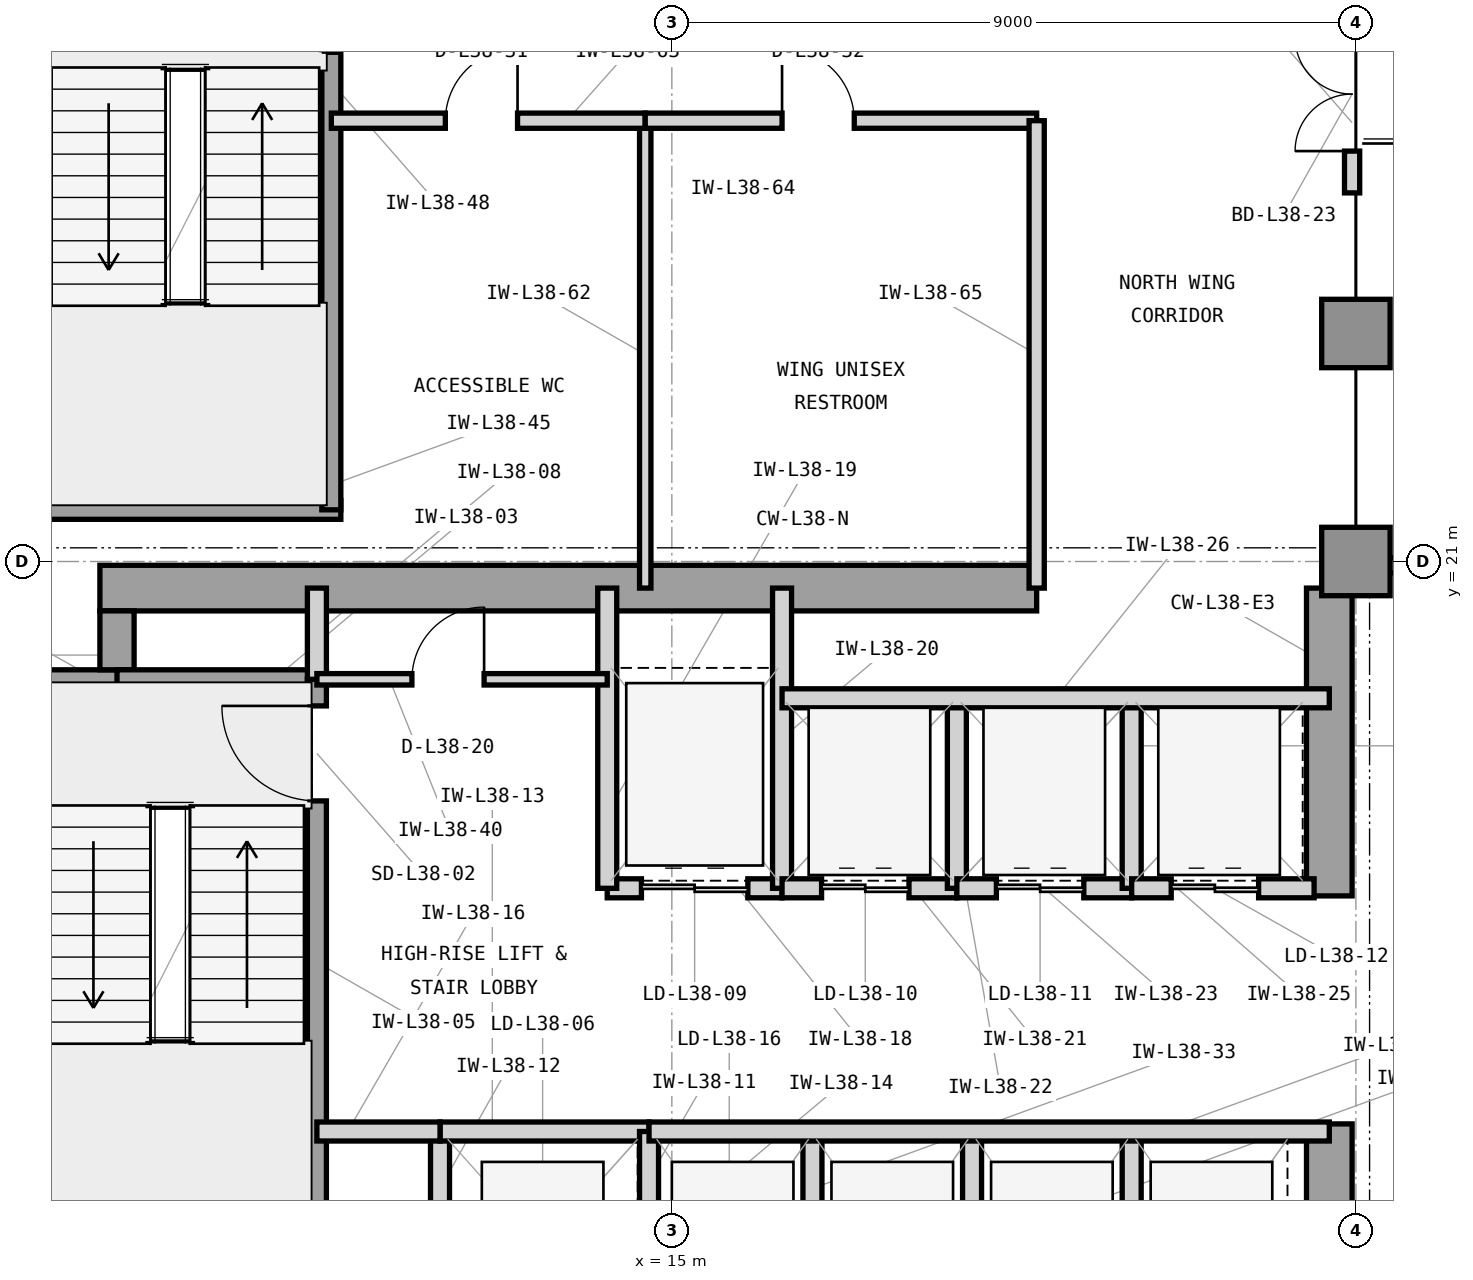
"""IFC4 building model, lengths in metres.
Left out: names, types, materials, properties, quantities, classifications, styles, units other than length and angle.
Written with IfcOpenShell. Run it as: python <this file> out.ifc"""

import sys

from ifc_helpers import new_model, si_unit, direction, frame, frame_2d, origin, origin_2d, place, context, subcontext, project, spatial, rectangle, extrude, element, fill, save


model = new_model("IFC4")
c1 = context("Model", 3, precision=1e-05, world=origin(), true_north=direction((0.0, 1.0)))
c2 = subcontext(c1, "Body", "Model", "MODEL_VIEW")
j1 = project(units=[si_unit("LENGTHUNIT", "METRE"), si_unit("PLANEANGLEUNIT", "RADIAN")], contexts=[c1])
p1 = place(None, origin())
s1 = spatial("IfcSite", under=j1, at=p1, CompositionType="ELEMENT")
p2 = place(p1, origin())
s2 = spatial("IfcBuilding", under=s1, at=p2, CompositionType="ELEMENT")
p3 = place(p2, frame((0.0, 0.0, 160.2)))
s3 = spatial("IfcBuildingStorey", under=s2, at=p3, CompositionType="ELEMENT", Elevation=160.2)
p4 = place(p3, frame((7.475, 20.65, 0.0), z_axis=(0.0, 0.0, 1.0), x_axis=(1.0, 0.0, 0.0)))
e1 = element("IfcWall", 1, at=p4, inside=s3, PredefinedType="SHEAR", context=c2, shape_type="SweptSolid", body=[
    extrude(rectangle(XDim=12.325, YDim=0.6, at=frame_2d((6.163, 0.0))), origin(), (0.0, 0.0, 1.0), 4.2),
])
p5 = place(p3, frame((23.65, 10.4, 0.0), z_axis=(0.0, 0.0, 1.0), x_axis=(0.0, 1.0, 0.0)))
e2 = element("IfcWall", 2, at=p5, inside=s3, PredefinedType="SHEAR", context=c2, shape_type="SweptSolid", body=[
    extrude(rectangle(XDim=3.2, YDim=0.6, at=frame_2d((1.6, 0.0))), origin(), (0.0, 0.0, 1.0), 4.2),
])
p6 = place(p3, frame((23.65, 16.6, 0.0), z_axis=(0.0, 0.0, 1.0), x_axis=(0.0, 1.0, 0.0)))
e3 = element("IfcWall", 3, at=p6, inside=s3, PredefinedType="SHEAR", context=c2, shape_type="SweptSolid", body=[
    extrude(rectangle(XDim=4.05, YDim=0.6, at=frame_2d((2.025, 0.0))), origin(), (0.0, 0.0, 1.0), 4.2),
])
p7 = place(p3, frame((6.65, 19.35, 0.0), z_axis=(0.0, 0.0, 1.0), x_axis=(1.0, 0.0, 0.0)))
e4 = element("IfcWall", 4, at=p7, inside=s3, PredefinedType="SHEAR", context=c2, shape_type="SweptSolid", body=[
    extrude(rectangle(XDim=1.275, YDim=0.45, at=frame_2d((0.638, 0.0))), origin(), (0.0, 0.0, 1.0), 4.2),
])
p8 = place(p3, frame((7.7, 19.575, 0.0), z_axis=(0.0, 0.0, 1.0), x_axis=(0.0, 1.0, 0.0)))
e5 = element("IfcWall", 5, at=p8, inside=s3, PredefinedType="SHEAR", context=c2, shape_type="SweptSolid", body=[
    extrude(rectangle(XDim=0.775, YDim=0.45, at=frame_2d((0.388, 0.0))), origin(), (0.0, 0.0, 1.0), 4.2),
])
for number, where, z_axis, x_axis in (
    (6, (24.0, 21.0, 0.0), (0.0, 0.0, 1.0), (1.0, 0.0, 0.0)),
    (7, (24.0, 24.0, 0.0), (0.0, 0.0, 1.0), (1.0, 0.0, 0.0)),
):
    element("IfcColumn", number, at=place(p3, frame(where, z_axis=z_axis, x_axis=x_axis)), inside=s3, PredefinedType="COLUMN", context=c2, shape_type="SweptSolid", body=[
        extrude(rectangle(XDim=0.9, YDim=0.9, at=origin_2d()), origin(), (0.0, 0.0, 1.0), 4.2),
    ])
p9 = place(p3, frame((7.7, 19.45, 0.0), z_axis=(0.0, 0.0, 1.0), x_axis=(1.0, 0.0, 0.0)))
e8 = element("IfcWall", 8, at=p9, inside=s3, PredefinedType="SHEAR", context=c2, shape_type="SweptSolid", body=[
    extrude(rectangle(XDim=2.755, YDim=0.25, at=frame_2d((1.377, 0.0))), origin(), (0.0, 0.0, 1.0), 4.2),
])
p10 = place(p3, frame((10.33, 12.0, 0.0), z_axis=(0.0, 0.0, 1.0), x_axis=(0.0, 1.0, 0.0)))
e9 = element("IfcWall", 9, at=p10, inside=s3, PredefinedType="SHEAR", context=c2, shape_type="SweptSolid", body=[
    extrude(rectangle(XDim=7.45, YDim=0.25, at=frame_2d((3.725, 0.0))), origin(), (0.0, 0.0, 1.0), 4.2),
])
p11 = place(p10, frame((5.85, 0.0, 0.0)))
e10 = element("IfcOpeningElement", 10, at=p11, cuts=e9, PredefinedType="OPENING", context=c2, shape_type="SweptSolid", body=[
    extrude(rectangle(XDim=1.25, YDim=2.2, at=frame_2d((0.625, 1.1))), frame((0.0, 0.135, 0.0), z_axis=(0.0, -1.0, 0.0), x_axis=(1.0, 0.0, 0.0)), (0.0, 0.0, 1.0), 0.27),
])
p12 = place(p3, frame((10.33, 19.45, 0.0), z_axis=(0.0, 0.0, 1.0), x_axis=(0.0, 1.0, 0.0)))
e11 = element("IfcWall", 11, at=p12, inside=s3, PredefinedType="PARTITIONING", context=c2, shape_type="SweptSolid", body=[
    extrude(rectangle(XDim=1.2, YDim=0.25, at=frame_2d((0.6, 0.0))), origin(), (0.0, 0.0, 1.0), 3.373),
])
p13 = place(p3, frame((11.95, 10.5, 0.0), z_axis=(0.0, 0.0, 1.0), x_axis=(0.0, 1.0, 0.0)))
e12 = element("IfcWall", 12, at=p13, inside=s3, PredefinedType="PARTITIONING", context=c2, shape_type="SweptSolid", body=[
    extrude(rectangle(XDim=3.0, YDim=0.25, at=frame_2d((1.5, 0.0))), origin(), (0.0, 0.0, 1.0), 3.93),
])
p14 = place(p3, frame((11.95, 13.5, 0.0), z_axis=(0.0, 0.0, 1.0), x_axis=(1.0, 0.0, 0.0)))
e13 = element("IfcWall", 13, at=p14, inside=s3, PredefinedType="PARTITIONING", context=c2, shape_type="SweptSolid", body=[
    extrude(rectangle(XDim=2.75, YDim=0.25, at=frame_2d((1.375, 0.0))), origin(), (0.0, 0.0, 1.0), 3.583),
])
p15 = place(p3, frame((14.7, 10.5, 0.0), z_axis=(0.0, 0.0, 1.0), x_axis=(0.0, 1.0, 0.0)))
e14 = element("IfcWall", 14, at=p15, inside=s3, PredefinedType="PARTITIONING", context=c2, shape_type="SweptSolid", body=[
    extrude(rectangle(XDim=3.0, YDim=0.25, at=frame_2d((1.5, 0.0))), origin(), (0.0, 0.0, 1.0), 3.93),
])
p16 = place(p3, frame((10.33, 13.5, 0.0), z_axis=(0.0, 0.0, 1.0), x_axis=(1.0, 0.0, 0.0)))
e15 = element("IfcWall", 15, at=p16, inside=s3, PredefinedType="PARTITIONING", context=c2, shape_type="SweptSolid", body=[
    extrude(rectangle(XDim=1.62, YDim=0.25, at=frame_2d((0.81, 0.0))), origin(), (0.0, 0.0, 1.0), 3.583),
])
p17 = place(p3, frame((14.15, 16.7, 0.0), z_axis=(0.0, 0.0, 1.0), x_axis=(1.0, 0.0, 0.0)))
e16 = element("IfcWall", 16, at=p17, inside=s3, PredefinedType="PARTITIONING", context=c2, shape_type="SweptSolid", body=[
    extrude(rectangle(XDim=2.3, YDim=0.25, at=frame_2d((1.15, 0.0))), origin(), (0.0, 0.0, 1.0), 3.583),
])
p18 = place(p17, frame((0.45, 0.0, 0.0)))
e17 = element("IfcOpeningElement", 17, at=p18, cuts=e16, PredefinedType="OPENING", context=c2, shape_type="SweptSolid", body=[
    extrude(rectangle(XDim=1.4, YDim=2.35, at=frame_2d((0.7, 1.175))), frame((0.0, 0.135, 0.0), z_axis=(0.0, -1.0, 0.0), x_axis=(1.0, 0.0, 0.0)), (0.0, 0.0, 1.0), 0.27),
])
for number, where, z_axis, x_axis in (
    (18, (14.15, 16.7, 0.0), (0.0, 0.0, 1.0), (0.0, 1.0, 0.0)),
    (19, (16.45, 16.7, 0.0), (0.0, 0.0, 1.0), (0.0, 1.0, 0.0)),
):
    element("IfcWall", number, at=place(p3, frame(where, z_axis=z_axis, x_axis=x_axis)), inside=s3, PredefinedType="PARTITIONING", context=c2, shape_type="SweptSolid", body=[
        extrude(rectangle(XDim=3.95, YDim=0.25, at=frame_2d((1.975, 0.0))), origin(), (0.0, 0.0, 1.0), 3.93),
    ])
p19 = place(p3, frame((16.45, 16.7, 0.0), z_axis=(0.0, 0.0, 1.0), x_axis=(1.0, 0.0, 0.0)))
e20 = element("IfcWall", 20, at=p19, inside=s3, PredefinedType="PARTITIONING", context=c2, shape_type="SweptSolid", body=[
    extrude(rectangle(XDim=2.3, YDim=0.25, at=frame_2d((1.15, 0.0))), origin(), (0.0, 0.0, 1.0), 3.583),
])
p20 = place(p19, frame((0.52, 0.0, 0.0)))
e21 = element("IfcOpeningElement", 21, at=p20, cuts=e20, PredefinedType="OPENING", context=c2, shape_type="SweptSolid", body=[
    extrude(rectangle(XDim=1.15, YDim=2.25, at=frame_2d((0.575, 1.125))), frame((0.0, 0.135, 0.0), z_axis=(0.0, -1.0, 0.0), x_axis=(1.0, 0.0, 0.0)), (0.0, 0.0, 1.0), 0.27),
])
p21 = place(p3, frame((18.75, 16.7, 0.0), z_axis=(0.0, 0.0, 1.0), x_axis=(0.0, 1.0, 0.0)))
e22 = element("IfcWall", 22, at=p21, inside=s3, PredefinedType="PARTITIONING", context=c2, shape_type="SweptSolid", body=[
    extrude(rectangle(XDim=2.5, YDim=0.25, at=frame_2d((1.25, 0.0))), origin(), (0.0, 0.0, 1.0), 3.93),
])
p22 = place(p3, frame((18.75, 16.7, 0.0), z_axis=(0.0, 0.0, 1.0), x_axis=(1.0, 0.0, 0.0)))
e23 = element("IfcWall", 23, at=p22, inside=s3, PredefinedType="PARTITIONING", context=c2, shape_type="SweptSolid", body=[
    extrude(rectangle(XDim=2.3, YDim=0.25, at=frame_2d((1.15, 0.0))), origin(), (0.0, 0.0, 1.0), 3.583),
])
p23 = place(p22, frame((0.52, 0.0, 0.0)))
e24 = element("IfcOpeningElement", 24, at=p23, cuts=e23, PredefinedType="OPENING", context=c2, shape_type="SweptSolid", body=[
    extrude(rectangle(XDim=1.15, YDim=2.25, at=frame_2d((0.575, 1.125))), frame((0.0, 0.135, 0.0), z_axis=(0.0, -1.0, 0.0), x_axis=(1.0, 0.0, 0.0)), (0.0, 0.0, 1.0), 0.27),
])
p24 = place(p3, frame((21.05, 16.7, 0.0), z_axis=(0.0, 0.0, 1.0), x_axis=(0.0, 1.0, 0.0)))
e25 = element("IfcWall", 25, at=p24, inside=s3, PredefinedType="PARTITIONING", context=c2, shape_type="SweptSolid", body=[
    extrude(rectangle(XDim=2.5, YDim=0.25, at=frame_2d((1.25, 0.0))), origin(), (0.0, 0.0, 1.0), 3.93),
])
p25 = place(p3, frame((21.05, 16.7, 0.0), z_axis=(0.0, 0.0, 1.0), x_axis=(1.0, 0.0, 0.0)))
e26 = element("IfcWall", 26, at=p25, inside=s3, PredefinedType="PARTITIONING", context=c2, shape_type="SweptSolid", body=[
    extrude(rectangle(XDim=2.4, YDim=0.25, at=frame_2d((1.2, 0.0))), origin(), (0.0, 0.0, 1.0), 3.583),
])
p26 = place(p25, frame((0.52, 0.0, 0.0)))
e27 = element("IfcOpeningElement", 27, at=p26, cuts=e26, PredefinedType="OPENING", context=c2, shape_type="SweptSolid", body=[
    extrude(rectangle(XDim=1.15, YDim=2.25, at=frame_2d((0.575, 1.125))), frame((0.0, 0.135, 0.0), z_axis=(0.0, -1.0, 0.0), x_axis=(1.0, 0.0, 0.0)), (0.0, 0.0, 1.0), 0.27),
])
p27 = place(p3, frame((16.45, 19.2, 0.0), z_axis=(0.0, 0.0, 1.0), x_axis=(1.0, 0.0, 0.0)))
e28 = element("IfcWall", 28, at=p27, inside=s3, PredefinedType="PARTITIONING", context=c2, shape_type="SweptSolid", body=[
    extrude(rectangle(XDim=7.2, YDim=0.25, at=frame_2d((3.6, 0.0))), origin(), (0.0, 0.0, 1.0), 3.93),
])
for number, where, z_axis, x_axis in (
    (29, (16.85, 10.5, 0.0), (0.0, 0.0, 1.0), (0.0, 1.0, 0.0)),
    (30, (18.95, 10.5, 0.0), (0.0, 0.0, 1.0), (0.0, 1.0, 0.0)),
    (31, (21.05, 10.5, 0.0), (0.0, 0.0, 1.0), (0.0, 1.0, 0.0)),
):
    element("IfcWall", number, at=place(p3, frame(where, z_axis=z_axis, x_axis=x_axis)), inside=s3, PredefinedType="PARTITIONING", context=c2, shape_type="SweptSolid", body=[
        extrude(rectangle(XDim=3.0, YDim=0.25, at=frame_2d((1.5, 0.0))), origin(), (0.0, 0.0, 1.0), 3.93),
    ])
p28 = place(p3, frame((14.7, 13.5, 0.0), z_axis=(0.0, 0.0, 1.0), x_axis=(1.0, 0.0, 0.0)))
e32 = element("IfcWall", 32, at=p28, inside=s3, PredefinedType="PARTITIONING", context=c2, shape_type="SweptSolid", body=[
    extrude(rectangle(XDim=8.95, YDim=0.25, at=frame_2d((4.475, 0.0))), origin(), (0.0, 0.0, 1.0), 3.583),
])
p29 = place(p3, frame((10.33, 19.45, 0.0), z_axis=(0.0, 0.0, 1.0), x_axis=(1.0, 0.0, 0.0)))
e33 = element("IfcWall", 33, at=p29, inside=s3, PredefinedType="PARTITIONING", context=c2, shape_type="SweptSolid", body=[
    extrude(rectangle(XDim=3.82, YDim=0.15, at=frame_2d((1.91, 0.0))), origin(), (0.0, 0.0, 1.0), 3.93),
])
p30 = place(p29, frame((1.25, 0.0, 0.0)))
e34 = element("IfcOpeningElement", 34, at=p30, cuts=e33, PredefinedType="OPENING", context=c2, shape_type="SweptSolid", body=[
    extrude(rectangle(XDim=0.95, YDim=2.1, at=frame_2d((0.475, 1.05))), frame((0.0, 0.085, 0.0), z_axis=(0.0, -1.0, 0.0), x_axis=(1.0, 0.0, 0.0)), (0.0, 0.0, 1.0), 0.17),
])
p31 = place(p3, frame((6.555, 21.68, 0.0), z_axis=(0.0, 0.0, 1.0), x_axis=(1.0, 0.0, 0.0)))
e35 = element("IfcWall", 35, at=p31, inside=s3, PredefinedType="SHEAR", context=c2, shape_type="SweptSolid", body=[
    extrude(rectangle(XDim=4.09, YDim=0.25, at=frame_2d((2.045, 0.0))), origin(), (0.0, 0.0, 1.0), 4.2),
])
p32 = place(p3, frame((10.52, 21.68, 0.0), z_axis=(0.0, 0.0, 1.0), x_axis=(0.0, 1.0, 0.0)))
e36 = element("IfcWall", 36, at=p32, inside=s3, PredefinedType="SHEAR", context=c2, shape_type="SweptSolid", body=[
    extrude(rectangle(XDim=7.5, YDim=0.25, at=frame_2d((3.75, 0.0))), origin(), (0.0, 0.0, 1.0), 4.2),
])
p33 = place(p32, frame((6.02, 0.0, 0.0)))
e37 = element("IfcOpeningElement", 37, at=p33, cuts=e36, PredefinedType="OPENING", context=c2, shape_type="SweptSolid", body=[
    extrude(rectangle(XDim=1.25, YDim=2.2, at=frame_2d((0.625, 1.1))), frame((0.0, 0.135, 0.0), z_axis=(0.0, -1.0, 0.0), x_axis=(1.0, 0.0, 0.0)), (0.0, 0.0, 1.0), 0.27),
])
p34 = place(p3, frame((23.95, 25.85, 0.0), z_axis=(0.0, 0.0, 1.0), x_axis=(0.0, 1.0, 0.0)))
e38 = element("IfcWall", 38, at=p34, inside=s3, PredefinedType="PARTITIONING", context=c2, shape_type="SweptSolid", body=[
    extrude(rectangle(XDim=3.7, YDim=0.2, at=frame_2d((1.85, 0.0))), origin(), (0.0, 0.0, 1.0), 3.386),
])
p35 = place(p34, frame((0.55, 0.0, 0.0)))
e39 = element("IfcOpeningElement", 39, at=p35, cuts=e38, PredefinedType="OPENING", context=c2, shape_type="SweptSolid", body=[
    extrude(rectangle(XDim=1.5, YDim=2.3, at=frame_2d((0.75, 1.15))), frame((0.0, 0.11, 0.0), z_axis=(0.0, -1.0, 0.0), x_axis=(1.0, 0.0, 0.0)), (0.0, 0.0, 1.0), 0.22),
])
p36 = place(p3, frame((24.05, 20.95, 0.0), z_axis=(0.0, 0.0, 1.0), x_axis=(1.0, 0.0, 0.0)))
e40 = element("IfcWall", 40, at=p36, inside=s3, PredefinedType="PARTITIONING", context=c2, shape_type="SweptSolid", body=[
    extrude(rectangle(XDim=8.5, YDim=0.2, at=frame_2d((4.25, 0.0))), origin(), (0.0, 0.0, 1.0), 3.386),
])
p37 = place(p36, frame((0.6, 0.0, 0.0)))
e41 = element("IfcOpeningElement", 41, at=p37, cuts=e40, PredefinedType="OPENING", context=c2, shape_type="SweptSolid", body=[
    extrude(rectangle(XDim=1.5, YDim=2.3, at=frame_2d((0.75, 1.15))), frame((0.0, 0.11, 0.0), z_axis=(0.0, -1.0, 0.0), x_axis=(1.0, 0.0, 0.0)), (0.0, 0.0, 1.0), 0.22),
])
p38 = place(p3, frame((14.65, 20.65, 0.0), z_axis=(0.0, 0.0, 1.0), x_axis=(0.0, 1.0, 0.0)))
e42 = element("IfcWall", 42, at=p38, inside=s3, PredefinedType="PARTITIONING", context=c2, shape_type="SweptSolid", body=[
    extrude(rectangle(XDim=6.15, YDim=0.15, at=frame_2d((3.075, 0.0))), origin(), (0.0, 0.0, 1.0), 3.93),
])
p39 = place(p3, frame((10.52, 26.8, 0.0), z_axis=(0.0, 0.0, 1.0), x_axis=(1.0, 0.0, 0.0)))
e43 = element("IfcWall", 43, at=p39, inside=s3, PredefinedType="PARTITIONING", context=c2, shape_type="SweptSolid", body=[
    extrude(rectangle(XDim=4.13, YDim=0.2, at=frame_2d((2.065, 0.0))), origin(), (0.0, 0.0, 1.0), 3.93),
])
p40 = place(p39, frame((1.5, 0.0, 0.0)))
e44 = element("IfcOpeningElement", 44, at=p40, cuts=e43, PredefinedType="OPENING", context=c2, shape_type="SweptSolid", body=[
    extrude(rectangle(XDim=0.95, YDim=2.1, at=frame_2d((0.475, 1.05))), frame((0.0, 0.11, 0.0), z_axis=(0.0, -1.0, 0.0), x_axis=(1.0, 0.0, 0.0)), (0.0, 0.0, 1.0), 0.22),
])
p41 = place(p3, frame((14.65, 26.8, 0.0), z_axis=(0.0, 0.0, 1.0), x_axis=(1.0, 0.0, 0.0)))
e45 = element("IfcWall", 45, at=p41, inside=s3, PredefinedType="PARTITIONING", context=c2, shape_type="SweptSolid", body=[
    extrude(rectangle(XDim=5.15, YDim=0.2, at=frame_2d((2.575, 0.0))), origin(), (0.0, 0.0, 1.0), 3.93),
])
p42 = place(p41, frame((1.8, 0.0, 0.0)))
e46 = element("IfcOpeningElement", 46, at=p42, cuts=e45, PredefinedType="OPENING", context=c2, shape_type="SweptSolid", body=[
    extrude(rectangle(XDim=0.95, YDim=2.1, at=frame_2d((0.475, 1.05))), frame((0.0, 0.11, 0.0), z_axis=(0.0, -1.0, 0.0), x_axis=(1.0, 0.0, 0.0)), (0.0, 0.0, 1.0), 0.22),
])
p43 = place(p3, frame((19.8, 20.65, 0.0), z_axis=(0.0, 0.0, 1.0), x_axis=(0.0, 1.0, 0.0)))
e47 = element("IfcWall", 47, at=p43, inside=s3, PredefinedType="PARTITIONING", context=c2, shape_type="SweptSolid", body=[
    extrude(rectangle(XDim=6.15, YDim=0.2, at=frame_2d((3.075, 0.0))), origin(), (0.0, 0.0, 1.0), 3.93),
])
p44 = place(p11, origin())
e48 = element("IfcDoor", 48, at=p44, inside=s3, OperationType="SINGLE_SWING_RIGHT", PredefinedType="DOOR", context=c2, shape_type="SweptSolid", body=[
    extrude(rectangle(XDim=1.25, YDim=2.2, at=frame_2d((0.625, 1.1))), frame((0.0, 0.025, 0.0), z_axis=(0.0, -1.0, 0.0), x_axis=(1.0, 0.0, 0.0)), (0.0, 0.0, 1.0), 0.05),
])
fill(e10, e48)
p45 = place(p18, origin())
e49 = element("IfcDoor", 49, at=p45, inside=s3, OperationType="DOUBLE_DOOR_SLIDING", PredefinedType="DOOR", context=c2, shape_type="SweptSolid", body=[
    extrude(rectangle(XDim=1.4, YDim=2.35, at=frame_2d((0.7, 1.175))), frame((0.0, 0.025, 0.0), z_axis=(0.0, -1.0, 0.0), x_axis=(1.0, 0.0, 0.0)), (0.0, 0.0, 1.0), 0.05),
])
fill(e17, e49)
p46 = place(p20, origin())
e50 = element("IfcDoor", 50, at=p46, inside=s3, OperationType="DOUBLE_DOOR_SLIDING", PredefinedType="DOOR", context=c2, shape_type="SweptSolid", body=[
    extrude(rectangle(XDim=1.15, YDim=2.25, at=frame_2d((0.575, 1.125))), frame((0.0, 0.025, 0.0), z_axis=(0.0, -1.0, 0.0), x_axis=(1.0, 0.0, 0.0)), (0.0, 0.0, 1.0), 0.05),
])
fill(e21, e50)
p47 = place(p23, origin())
e51 = element("IfcDoor", 51, at=p47, inside=s3, OperationType="DOUBLE_DOOR_SLIDING", PredefinedType="DOOR", context=c2, shape_type="SweptSolid", body=[
    extrude(rectangle(XDim=1.15, YDim=2.25, at=frame_2d((0.575, 1.125))), frame((0.0, 0.025, 0.0), z_axis=(0.0, -1.0, 0.0), x_axis=(1.0, 0.0, 0.0)), (0.0, 0.0, 1.0), 0.05),
])
fill(e24, e51)
p48 = place(p26, origin())
e52 = element("IfcDoor", 52, at=p48, inside=s3, OperationType="DOUBLE_DOOR_SLIDING", PredefinedType="DOOR", context=c2, shape_type="SweptSolid", body=[
    extrude(rectangle(XDim=1.15, YDim=2.25, at=frame_2d((0.575, 1.125))), frame((0.0, 0.025, 0.0), z_axis=(0.0, -1.0, 0.0), x_axis=(1.0, 0.0, 0.0)), (0.0, 0.0, 1.0), 0.05),
])
fill(e27, e52)
p49 = place(p30, origin())
e53 = element("IfcDoor", 53, at=p49, inside=s3, OperationType="SINGLE_SWING_RIGHT", PredefinedType="DOOR", context=c2, shape_type="SweptSolid", body=[
    extrude(rectangle(XDim=0.95, YDim=2.1, at=frame_2d((0.475, 1.05))), frame((0.0, 0.025, 0.0), z_axis=(0.0, -1.0, 0.0), x_axis=(1.0, 0.0, 0.0)), (0.0, 0.0, 1.0), 0.05),
])
fill(e34, e53)
p50 = place(p35, origin())
e54 = element("IfcDoor", 54, at=p50, inside=s3, OperationType="DOUBLE_DOOR_SINGLE_SWING", PredefinedType="DOOR", context=c2, shape_type="SweptSolid", body=[
    extrude(rectangle(XDim=1.5, YDim=2.3, at=frame_2d((0.75, 1.15))), frame((0.0, 0.025, 0.0), z_axis=(0.0, -1.0, 0.0), x_axis=(1.0, 0.0, 0.0)), (0.0, 0.0, 1.0), 0.05),
])
fill(e39, e54)
p51 = place(p40, origin())
e55 = element("IfcDoor", 55, at=p51, inside=s3, OperationType="SINGLE_SWING_RIGHT", PredefinedType="DOOR", context=c2, shape_type="SweptSolid", body=[
    extrude(rectangle(XDim=0.95, YDim=2.1, at=frame_2d((0.475, 1.05))), frame((0.0, 0.025, 0.0), z_axis=(0.0, -1.0, 0.0), x_axis=(1.0, 0.0, 0.0)), (0.0, 0.0, 1.0), 0.05),
])
fill(e44, e55)
p52 = place(p42, origin())
e56 = element("IfcDoor", 56, at=p52, inside=s3, OperationType="SINGLE_SWING_LEFT", PredefinedType="DOOR", context=c2, shape_type="SweptSolid", body=[
    extrude(rectangle(XDim=0.95, YDim=2.1, at=frame_2d((0.475, 1.05))), frame((0.0, 0.025, 0.0), z_axis=(0.0, -1.0, 0.0), x_axis=(1.0, 0.0, 0.0)), (0.0, 0.0, 1.0), 0.05),
])
fill(e46, e56)
save(model, sys.argv[1])
